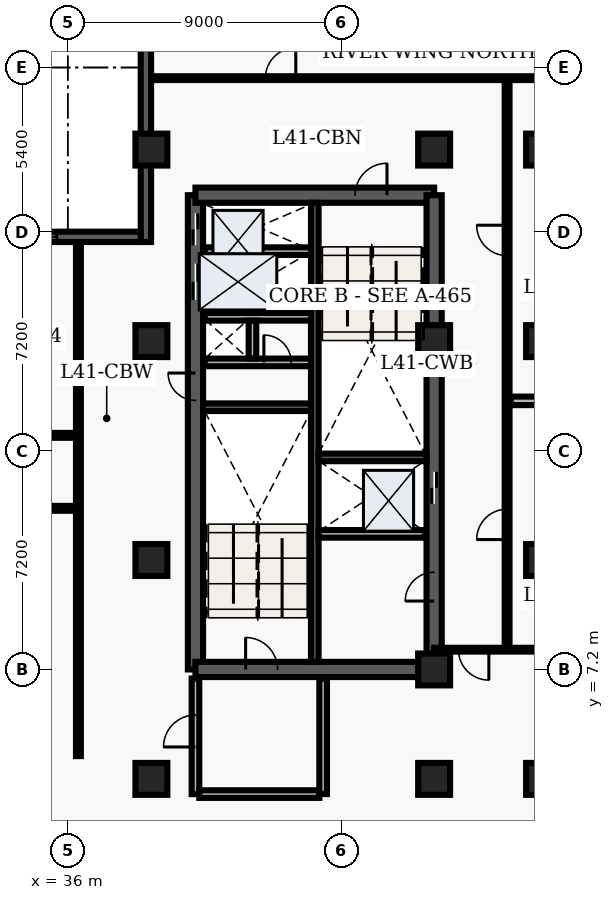
"""IFC4 building model, lengths in metres.
Left out: names, types, materials, properties, quantities, classifications, styles, units other than length and angle.
Written with IfcOpenShell. Run it as: python <this file> out.ifc"""

import sys

from ifc_helpers import new_model, entity, si_unit, converted_unit, direction, frame, origin_with_axes, origin_2d_with_axis, place, context, subcontext, project, spatial, polyline, rectangle, outline, extrude, element, fill, save


model = new_model("IFC4")
c1 = context("Model", 3, precision=1e-05, world=origin_with_axes(), true_north=direction((0.0, 1.0)))
c2 = subcontext(c1, "Body", "Model", "MODEL_VIEW")
j1 = project(units=[si_unit("LENGTHUNIT", "METRE"), converted_unit("PLANEANGLEUNIT", "DEGREE", entity("IfcPlaneAngleMeasure", 0.017), si_unit("PLANEANGLEUNIT", "RADIAN"), dimensions=[0, 0, 0, 0, 0, 0, 0])], contexts=[c1])
p1 = place(None, origin_with_axes())
s1 = spatial("IfcSite", under=j1, at=p1, CompositionType="ELEMENT")
p2 = place(p1, origin_with_axes())
s2 = spatial("IfcBuilding", under=s1, at=p2, CompositionType="ELEMENT")
p3 = place(p2, frame((0.0, 0.0, 168.0), z_axis=(0.0, 0.0, 1.0), x_axis=(1.0, 0.0, 0.0)))
s3 = spatial("IfcBuildingStorey", under=s2, at=p3, CompositionType="ELEMENT", Elevation=168.0)
p4 = place(p3, frame((40.2, 7.2, 0.0), z_axis=(0.0, 0.0, 1.0), x_axis=(0.0, 1.0, 0.0)))
e1 = element("IfcWall", 1, at=p4, inside=s3, PredefinedType="SHEAR", context=c2, shape_type="SweptSolid", body=[
    extrude(outline(polyline([(0.0, -0.25), (15.6, -0.25), (15.6, 0.25), (0.0, 0.25), (0.0, -0.25)])), origin_with_axes(), (0.0, 0.0, 1.0), 3.66),
])
p5 = place(p4, frame((14.475, 0.0, 0.0), z_axis=(0.0, 0.0, 1.0), x_axis=(1.0, 0.0, 0.0)))
e2 = element("IfcOpeningElement", 2, at=p5, cuts=e1, PredefinedType="OPENING", context=c2, shape_type="SweptSolid", body=[
    extrude(rectangle(XDim=1.05, YDim=0.52, at=origin_2d_with_axis()), origin_with_axes(), (0.0, 0.0, 1.0), 2.15),
])
p6 = place(p4, frame((12.75, 0.0, 0.0), z_axis=(0.0, 0.0, 1.0), x_axis=(1.0, 0.0, 0.0)))
e3 = element("IfcOpeningElement", 3, at=p6, cuts=e1, PredefinedType="OPENING", context=c2, shape_type="SweptSolid", body=[
    extrude(rectangle(XDim=1.2, YDim=0.52, at=origin_2d_with_axis()), origin_with_axes(), (0.0, 0.0, 1.0), 2.15),
])
p7 = place(p4, frame((9.3, 0.0, 0.0), z_axis=(0.0, 0.0, 1.0), x_axis=(1.0, 0.0, 0.0)))
e4 = element("IfcOpeningElement", 4, at=p7, cuts=e1, PredefinedType="OPENING", context=c2, shape_type="SweptSolid", body=[
    extrude(rectangle(XDim=0.9, YDim=0.52, at=origin_2d_with_axis()), origin_with_axes(), (0.0, 0.0, 1.0), 2.15),
])
p8 = place(p3, frame((40.2, 7.2, 0.0), z_axis=(0.0, 0.0, 1.0), x_axis=(1.0, 0.0, 0.0)))
e5 = element("IfcWall", 5, at=p8, inside=s3, PredefinedType="SHEAR", context=c2, shape_type="SweptSolid", body=[
    extrude(outline(polyline([(0.0, -0.25), (7.85, -0.25), (7.85, 0.25), (0.0, 0.25), (0.0, -0.25)])), origin_with_axes(), (0.0, 0.0, 1.0), 3.66),
])
p9 = place(p8, frame((2.175, 0.0, 0.0), z_axis=(0.0, 0.0, 1.0), x_axis=(1.0, 0.0, 0.0)))
e6 = element("IfcOpeningElement", 6, at=p9, cuts=e5, PredefinedType="OPENING", context=c2, shape_type="SweptSolid", body=[
    extrude(rectangle(XDim=1.05, YDim=0.52, at=origin_2d_with_axis()), origin_with_axes(), (0.0, 0.0, 1.0), 2.15),
])
p10 = place(p3, frame((40.2, 22.8, 0.0), z_axis=(0.0, 0.0, 1.0), x_axis=(1.0, 0.0, 0.0)))
e7 = element("IfcWall", 7, at=p10, inside=s3, PredefinedType="SHEAR", context=c2, shape_type="SweptSolid", body=[
    extrude(outline(polyline([(0.0, -0.25), (7.85, -0.25), (7.85, 0.25), (0.0, 0.25), (0.0, -0.25)])), origin_with_axes(), (0.0, 0.0, 1.0), 3.66),
])
p11 = place(p10, frame((5.775, 0.0, 0.0), z_axis=(0.0, 0.0, 1.0), x_axis=(1.0, 0.0, 0.0)))
e8 = element("IfcOpeningElement", 8, at=p11, cuts=e7, PredefinedType="OPENING", context=c2, shape_type="SweptSolid", body=[
    extrude(rectangle(XDim=1.05, YDim=0.52, at=origin_2d_with_axis()), origin_with_axes(), (0.0, 0.0, 1.0), 2.15),
])
p12 = place(p3, frame((48.05, 7.2, 0.0), z_axis=(0.0, 0.0, 1.0), x_axis=(0.0, 1.0, 0.0)))
e9 = element("IfcWall", 9, at=p12, inside=s3, PredefinedType="SHEAR", context=c2, shape_type="SweptSolid", body=[
    extrude(outline(polyline([(0.0, -0.25), (15.6, -0.25), (15.6, 0.25), (0.0, 0.25), (0.0, -0.25)])), origin_with_axes(), (0.0, 0.0, 1.0), 3.66),
])
p13 = place(p12, frame((5.975, 0.0, 0.0), z_axis=(0.0, 0.0, 1.0), x_axis=(1.0, 0.0, 0.0)))
e10 = element("IfcOpeningElement", 10, at=p13, cuts=e9, PredefinedType="OPENING", context=c2, shape_type="SweptSolid", body=[
    extrude(rectangle(XDim=1.05, YDim=0.52, at=origin_2d_with_axis()), origin_with_axes(), (0.0, 0.0, 1.0), 2.15),
])
p14 = place(p12, frame((2.725, 0.0, 0.0), z_axis=(0.0, 0.0, 1.0), x_axis=(1.0, 0.0, 0.0)))
e11 = element("IfcOpeningElement", 11, at=p14, cuts=e9, PredefinedType="OPENING", context=c2, shape_type="SweptSolid", body=[
    extrude(rectangle(XDim=0.95, YDim=0.52, at=origin_2d_with_axis()), origin_with_axes(), (0.0, 0.0, 1.0), 2.15),
])
p15 = place(p3, frame((44.125, 7.45, 0.0), z_axis=(0.0, 0.0, 1.0), x_axis=(0.0, 1.0, 0.0)))
e12 = element("IfcWall", 12, at=p15, inside=s3, PredefinedType="SHEAR", context=c2, shape_type="SweptSolid", body=[
    extrude(outline(polyline([(0.0, -0.125), (15.1, -0.125), (15.1, 0.125), (0.0, 0.125), (0.0, -0.125)])), origin_with_axes(), (0.0, 0.0, 1.0), 3.66),
])
for number, where, z_axis, x_axis in (
    (13, (40.45, 15.825, 0.0), (0.0, 0.0, 1.0), (1.0, 0.0, 0.0)),
    (14, (44.25, 14.175, 0.0), (0.0, 0.0, 1.0), (1.0, 0.0, 0.0)),
):
    element("IfcWall", number, at=place(p3, frame(where, z_axis=z_axis, x_axis=x_axis)), inside=s3, PredefinedType="SHEAR", context=c2, shape_type="SweptSolid", body=[
        extrude(outline(polyline([(0.0, -0.125), (3.55, -0.125), (3.55, 0.125), (0.0, 0.125), (0.0, -0.125)])), origin_with_axes(), (0.0, 0.0, 1.0), 3.66),
    ])
p16 = place(p3, frame((40.5, 17.3, 0.0), z_axis=(0.0, 0.0, 1.0), x_axis=(1.0, 0.0, 0.0)))
e15 = element("IfcWall", 15, at=p16, inside=s3, PredefinedType="SOLIDWALL", context=c2, shape_type="SweptSolid", body=[
    extrude(outline(polyline([(0.0, -0.125), (3.5, -0.125), (3.5, 0.125), (0.0, 0.125), (0.0, -0.125)])), origin_with_axes(), (0.0, 0.0, 1.0), 2.7),
])
p17 = place(p16, frame((2.4, 0.0, 0.0), z_axis=(0.0, 0.0, 1.0), x_axis=(1.0, 0.0, 0.0)))
e16 = element("IfcOpeningElement", 16, at=p17, cuts=e15, PredefinedType="OPENING", context=c2, shape_type="SweptSolid", body=[
    extrude(rectangle(XDim=0.9, YDim=0.27, at=origin_2d_with_axis()), origin_with_axes(), (0.0, 0.0, 1.0), 2.15),
])
p18 = place(p3, frame((40.5, 18.8, 0.0), z_axis=(0.0, 0.0, 1.0), x_axis=(1.0, 0.0, 0.0)))
e17 = element("IfcWall", 17, at=p18, inside=s3, PredefinedType="SOLIDWALL", context=c2, shape_type="SweptSolid", body=[
    extrude(outline(polyline([(0.0, -0.125), (3.5, -0.125), (3.5, 0.125), (0.0, 0.125), (0.0, -0.125)])), origin_with_axes(), (0.0, 0.0, 1.0), 2.7),
])
p19 = place(p3, frame((42.075, 17.43, 0.0), z_axis=(0.0, 0.0, 1.0), x_axis=(0.0, 1.0, 0.0)))
e18 = element("IfcWall", 18, at=p19, inside=s3, PredefinedType="SOLIDWALL", context=c2, shape_type="SweptSolid", body=[
    extrude(outline(polyline([(0.0, -0.125), (1.24, -0.125), (1.24, 0.125), (0.0, 0.125), (0.0, -0.125)])), origin_with_axes(), (0.0, 0.0, 1.0), 2.7),
])
p20 = place(p3, frame((40.2, 3.1, 0.0), z_axis=(0.0, 0.0, 1.0), x_axis=(0.0, 1.0, 0.0)))
e19 = element("IfcWall", 19, at=p20, inside=s3, PredefinedType="SOLIDWALL", context=c2, shape_type="SweptSolid", body=[
    extrude(outline(polyline([(0.0, -0.125), (3.8, -0.125), (3.8, 0.125), (0.0, 0.125), (0.0, -0.125)])), origin_with_axes(), (0.0, 0.0, 1.0), 2.7),
])
p21 = place(p20, frame((2.075, 0.0, 0.0), z_axis=(0.0, 0.0, 1.0), x_axis=(1.0, 0.0, 0.0)))
e20 = element("IfcOpeningElement", 20, at=p21, cuts=e19, PredefinedType="OPENING", context=c2, shape_type="SweptSolid", body=[
    extrude(rectangle(XDim=1.05, YDim=0.27, at=origin_2d_with_axis()), origin_with_axes(), (0.0, 0.0, 1.0), 2.15),
])
p22 = place(p3, frame((40.325, 3.1, 0.0), z_axis=(0.0, 0.0, 1.0), x_axis=(1.0, 0.0, 0.0)))
e21 = element("IfcWall", 21, at=p22, inside=s3, PredefinedType="SOLIDWALL", context=c2, shape_type="SweptSolid", body=[
    extrude(outline(polyline([(0.0, -0.125), (3.95, -0.125), (3.95, 0.125), (0.0, 0.125), (0.0, -0.125)])), origin_with_axes(), (0.0, 0.0, 1.0), 2.7),
])
p23 = place(p3, frame((44.4, 3.1, 0.0), z_axis=(0.0, 0.0, 1.0), x_axis=(0.0, 1.0, 0.0)))
e22 = element("IfcWall", 22, at=p23, inside=s3, PredefinedType="SOLIDWALL", context=c2, shape_type="SweptSolid", body=[
    extrude(outline(polyline([(0.0, -0.125), (3.8, -0.125), (3.8, 0.125), (0.0, 0.125), (0.0, -0.125)])), origin_with_axes(), (0.0, 0.0, 1.0), 2.7),
])
for number, where, z_axis, x_axis in (
    (23, (38.75, 3.6, 0.0), (0.0, 0.0, 1.0), (1.0, 0.0, 0.0)),
    (24, (38.75, 10.8, 0.0), (0.0, 0.0, 1.0), (1.0, 0.0, 0.0)),
    (25, (38.75, 18.0, 0.0), (0.0, 0.0, 1.0), (1.0, 0.0, 0.0)),
    (26, (38.75, 24.3, 0.0), (0.0, 0.0, 1.0), (1.0, 0.0, 0.0)),
    (27, (48.05, 3.6, 0.0), (0.0, 0.0, 1.0), (1.0, 0.0, 0.0)),
    (28, (48.05, 7.2, 0.0), (0.0, 0.0, 1.0), (1.0, 0.0, 0.0)),
    (29, (48.05, 18.0, 0.0), (0.0, 0.0, 1.0), (1.0, 0.0, 0.0)),
    (30, (48.05, 24.3, 0.0), (0.0, 0.0, 1.0), (1.0, 0.0, 0.0)),
    (31, (51.6, 3.6, 0.0), (0.0, 0.0, 1.0), (1.0, 0.0, 0.0)),
    (32, (51.6, 10.8, 0.0), (0.0, 0.0, 1.0), (1.0, 0.0, 0.0)),
    (33, (51.6, 18.0, 0.0), (0.0, 0.0, 1.0), (1.0, 0.0, 0.0)),
    (34, (51.6, 24.3, 0.0), (0.0, 0.0, 1.0), (1.0, 0.0, 0.0)),
):
    element("IfcColumn", number, at=place(p3, frame(where, z_axis=z_axis, x_axis=x_axis)), inside=s3, PredefinedType="COLUMN", context=c2, shape_type="SweptSolid", body=[
        extrude(rectangle(XDim=1.05, YDim=1.05, at=origin_2d_with_axis()), origin_with_axes(), (0.0, 0.0, 1.0), 3.9),
    ])
for number, where, z_axis, x_axis in (
    (35, (40.5, 20.96, 0.0), (0.0, 0.0, 1.0), (1.0, 0.0, 0.0)),
    (36, (44.25, 11.66, 0.0), (0.0, 0.0, 1.0), (1.0, 0.0, 0.0)),
):
    element("IfcWall", number, at=place(p3, frame(where, z_axis=z_axis, x_axis=x_axis)), inside=s3, PredefinedType="SOLIDWALL", context=c2, shape_type="SweptSolid", body=[
        extrude(outline(polyline([(0.0, -0.125), (3.5, -0.125), (3.5, 0.125), (0.0, 0.125), (0.0, -0.125)])), origin_with_axes(), (0.0, 0.0, 1.0), 2.7),
    ])
p24 = place(p3, frame((21.15, 12.5, 0.0), z_axis=(0.0, 0.0, 1.0), x_axis=(1.0, 0.0, 0.0)))
e37 = element("IfcWall", 37, at=p24, inside=s3, PredefinedType="PARTITIONING", context=c2, shape_type="SweptSolid", body=[
    extrude(outline(polyline([(0.0, -0.08), (15.2, -0.08), (15.2, 0.08), (0.0, 0.08), (0.0, -0.08)])), origin_with_axes(), (0.0, 0.0, 1.0), 2.7),
])
p25 = place(p24, frame((3.47, 0.0, 0.0), z_axis=(0.0, 0.0, 1.0), x_axis=(1.0, 0.0, 0.0)))
e38 = element("IfcOpeningElement", 38, at=p25, cuts=e37, PredefinedType="OPENING", context=c2, shape_type="SweptSolid", body=[
    extrude(rectangle(XDim=1.0, YDim=0.18, at=origin_2d_with_axis()), origin_with_axes(), (0.0, 0.0, 1.0), 2.15),
])
p26 = place(p24, frame((10.94, 0.0, 0.0), z_axis=(0.0, 0.0, 1.0), x_axis=(1.0, 0.0, 0.0)))
e39 = element("IfcOpeningElement", 39, at=p26, cuts=e37, PredefinedType="OPENING", context=c2, shape_type="SweptSolid", body=[
    extrude(rectangle(XDim=1.0, YDim=0.18, at=origin_2d_with_axis()), origin_with_axes(), (0.0, 0.0, 1.0), 2.15),
])
p27 = place(p3, frame((21.15, 14.9, 0.0), z_axis=(0.0, 0.0, 1.0), x_axis=(1.0, 0.0, 0.0)))
e40 = element("IfcWall", 40, at=p27, inside=s3, PredefinedType="PARTITIONING", context=c2, shape_type="SweptSolid", body=[
    extrude(outline(polyline([(0.0, -0.08), (15.2, -0.08), (15.2, 0.08), (0.0, 0.08), (0.0, -0.08)])), origin_with_axes(), (0.0, 0.0, 1.0), 2.7),
])
p28 = place(p27, frame((2.563, 0.0, 0.0), z_axis=(0.0, 0.0, 1.0), x_axis=(1.0, 0.0, 0.0)))
e41 = element("IfcOpeningElement", 41, at=p28, cuts=e40, PredefinedType="OPENING", context=c2, shape_type="SweptSolid", body=[
    extrude(rectangle(XDim=1.0, YDim=0.18, at=origin_2d_with_axis()), origin_with_axes(), (0.0, 0.0, 1.0), 2.15),
])
p29 = place(p27, frame((6.457, 0.0, 0.0), z_axis=(0.0, 0.0, 1.0), x_axis=(1.0, 0.0, 0.0)))
e42 = element("IfcOpeningElement", 42, at=p29, cuts=e40, PredefinedType="OPENING", context=c2, shape_type="SweptSolid", body=[
    extrude(rectangle(XDim=1.0, YDim=0.18, at=origin_2d_with_axis()), origin_with_axes(), (0.0, 0.0, 1.0), 2.15),
])
p30 = place(p27, frame((9.627, 0.0, 0.0), z_axis=(0.0, 0.0, 1.0), x_axis=(1.0, 0.0, 0.0)))
e43 = element("IfcOpeningElement", 43, at=p30, cuts=e40, PredefinedType="OPENING", context=c2, shape_type="SweptSolid", body=[
    extrude(rectangle(XDim=1.0, YDim=0.18, at=origin_2d_with_axis()), origin_with_axes(), (0.0, 0.0, 1.0), 2.15),
])
p31 = place(p27, frame((13.204, 0.0, 0.0), z_axis=(0.0, 0.0, 1.0), x_axis=(1.0, 0.0, 0.0)))
e44 = element("IfcOpeningElement", 44, at=p31, cuts=e40, PredefinedType="OPENING", context=c2, shape_type="SweptSolid", body=[
    extrude(rectangle(XDim=1.0, YDim=0.18, at=origin_2d_with_axis()), origin_with_axes(), (0.0, 0.0, 1.0), 2.15),
])
p32 = place(p3, frame((36.35, 4.35, 0.0), z_axis=(0.0, 0.0, 1.0), x_axis=(0.0, 1.0, 0.0)))
e45 = element("IfcWall", 45, at=p32, inside=s3, PredefinedType="PARTITIONING", context=c2, shape_type="SweptSolid", body=[
    extrude(outline(polyline([(0.0, -0.08), (16.95, -0.08), (16.95, 0.08), (0.0, 0.08), (0.0, -0.08)])), origin_with_axes(), (0.0, 0.0, 1.0), 2.7),
])
p33 = place(p3, frame((50.45, 7.85, 0.0), z_axis=(0.0, 0.0, 1.0), x_axis=(0.0, 1.0, 0.0)))
e46 = element("IfcWall", 46, at=p33, inside=s3, PredefinedType="PARTITIONING", context=c2, shape_type="SweptSolid", body=[
    extrude(outline(polyline([(0.0, -0.08), (18.8, -0.08), (18.8, 0.08), (0.0, 0.08), (0.0, -0.08)])), origin_with_axes(), (0.0, 0.0, 1.0), 2.7),
])
p34 = place(p33, frame((4.122, 0.0, 0.0), z_axis=(0.0, 0.0, 1.0), x_axis=(1.0, 0.0, 0.0)))
e47 = element("IfcOpeningElement", 47, at=p34, cuts=e46, PredefinedType="OPENING", context=c2, shape_type="SweptSolid", body=[
    extrude(rectangle(XDim=1.0, YDim=0.18, at=origin_2d_with_axis()), origin_with_axes(), (0.0, 0.0, 1.0), 2.15),
])
p35 = place(p33, frame((13.463, 0.0, 0.0), z_axis=(0.0, 0.0, 1.0), x_axis=(1.0, 0.0, 0.0)))
e48 = element("IfcOpeningElement", 48, at=p35, cuts=e46, PredefinedType="OPENING", context=c2, shape_type="SweptSolid", body=[
    extrude(rectangle(XDim=1.0, YDim=0.18, at=origin_2d_with_axis()), origin_with_axes(), (0.0, 0.0, 1.0), 2.15),
])
p36 = place(p3, frame((59.665, 7.85, 0.0), z_axis=(0.0, 0.0, 1.0), x_axis=(-1.0, 0.0, 0.0)))
e49 = element("IfcWall", 49, at=p36, inside=s3, PredefinedType="PARTITIONING", context=c2, shape_type="SweptSolid", body=[
    extrude(outline(polyline([(0.0, -0.062), (11.615, -0.062), (11.615, 0.062), (0.0, 0.062), (0.0, -0.062)])), origin_with_axes(), (0.0, 0.0, 1.0), 2.7),
])
p37 = place(p36, frame((10.315, 0.0, 0.0), z_axis=(0.0, 0.0, 1.0), x_axis=(1.0, 0.0, 0.0)))
e50 = element("IfcOpeningElement", 50, at=p37, cuts=e49, PredefinedType="OPENING", context=c2, shape_type="SweptSolid", body=[
    extrude(rectangle(XDim=1.0, YDim=0.145, at=origin_2d_with_axis()), origin_with_axes(), (0.0, 0.0, 1.0), 2.15),
])
p38 = place(p3, frame((38.735, 26.65, 0.0), z_axis=(0.0, 0.0, 1.0), x_axis=(1.0, 0.0, 0.0)))
e51 = element("IfcWall", 51, at=p38, inside=s3, PredefinedType="PARTITIONING", context=c2, shape_type="SweptSolid", body=[
    extrude(outline(polyline([(0.0, -0.062), (20.905, -0.062), (20.905, 0.062), (0.0, 0.062), (0.0, -0.062)])), origin_with_axes(), (0.0, 0.0, 1.0), 2.7),
])
p39 = place(p38, frame((4.265, 0.0, 0.0), z_axis=(0.0, 0.0, 1.0), x_axis=(1.0, 0.0, 0.0)))
e52 = element("IfcOpeningElement", 52, at=p39, cuts=e51, PredefinedType="OPENING", context=c2, shape_type="SweptSolid", body=[
    extrude(rectangle(XDim=1.0, YDim=0.145, at=origin_2d_with_axis()), origin_with_axes(), (0.0, 0.0, 1.0), 2.15),
])
p40 = place(p3, frame((50.57, 16.035, 0.0), z_axis=(0.0, 0.0, 1.0), x_axis=(1.0, 0.0, 0.0)))
e53 = element("IfcWall", 53, at=p40, inside=s3, PredefinedType="PARTITIONING", context=c2, shape_type="SweptSolid", body=[
    extrude(outline(polyline([(0.0, -0.14), (9.095, -0.14), (9.095, 0.14), (0.0, 0.14), (0.0, -0.14)])), origin_with_axes(), (0.0, 0.0, 1.0), 2.7),
])
p41 = place(p3, frame((38.57, 21.26, 0.0), z_axis=(0.0, 0.0, 1.0), x_axis=(0.0, 1.0, 0.0)))
e54 = element("IfcWall", 54, at=p41, inside=s3, PredefinedType="SOLIDWALL", context=c2, shape_type="SweptSolid", body=[
    extrude(outline(polyline([(0.0, -0.17), (7.54, -0.17), (7.54, 0.17), (0.0, 0.17), (0.0, -0.17)])), origin_with_axes(), (0.0, 0.0, 1.0), 3.66),
])
p42 = place(p3, frame((23.919, 21.43, 0.0), z_axis=(0.0, 0.0, 1.0), x_axis=(1.0, 0.0, 0.0)))
e55 = element("IfcWall", 55, at=p42, inside=s3, PredefinedType="SOLIDWALL", context=c2, shape_type="SweptSolid", body=[
    extrude(outline(polyline([(0.0, -0.17), (14.481, -0.17), (14.481, 0.17), (0.0, 0.17), (0.0, -0.17)])), origin_with_axes(), (0.0, 0.0, 1.0), 3.66),
])
p43 = place(p42, frame((3.663, 0.0, 0.45), z_axis=(0.0, 0.0, 1.0), x_axis=(1.0, 0.0, 0.0)))
e56 = element("IfcOpeningElement", 56, at=p43, cuts=e55, PredefinedType="OPENING", context=c2, shape_type="SweptSolid", body=[
    extrude(rectangle(XDim=1.8, YDim=0.36, at=origin_2d_with_axis()), origin_with_axes(), (0.0, 0.0, 1.0), 2.1),
])
p44 = place(p42, frame((6.79, 0.0, 0.45), z_axis=(0.0, 0.0, 1.0), x_axis=(1.0, 0.0, 0.0)))
e57 = element("IfcOpeningElement", 57, at=p44, cuts=e55, PredefinedType="OPENING", context=c2, shape_type="SweptSolid", body=[
    extrude(rectangle(XDim=1.8, YDim=0.36, at=origin_2d_with_axis()), origin_with_axes(), (0.0, 0.0, 1.0), 2.1),
])
p45 = place(p42, frame((10.817, 0.0, 0.45), z_axis=(0.0, 0.0, 1.0), x_axis=(1.0, 0.0, 0.0)))
e58 = element("IfcOpeningElement", 58, at=p45, cuts=e55, PredefinedType="OPENING", context=c2, shape_type="SweptSolid", body=[
    extrude(rectangle(XDim=1.8, YDim=0.36, at=origin_2d_with_axis()), origin_with_axes(), (0.0, 0.0, 1.0), 2.1),
])
p46 = place(p12, frame((5.975, 0.0, 0.0), z_axis=(0.0, 0.0, 1.0), x_axis=(1.0, 0.0, 0.0)))
e59 = element("IfcDoor", 59, at=p46, inside=s3, OperationType="SLIDING_TO_LEFT", PredefinedType="DOOR", context=c2, shape_type="SweptSolid", body=[
    extrude(rectangle(XDim=1.05, YDim=0.09, at=origin_2d_with_axis()), origin_with_axes(), (0.0, 0.0, 1.0), 2.15),
])
fill(e10, e59)
p47 = place(p4, frame((14.475, 0.0, 0.0), z_axis=(0.0, 0.0, 1.0), x_axis=(1.0, 0.0, 0.0)))
e60 = element("IfcDoor", 60, at=p47, inside=s3, OperationType="SLIDING_TO_RIGHT", PredefinedType="DOOR", context=c2, shape_type="SweptSolid", body=[
    extrude(rectangle(XDim=1.05, YDim=0.09, at=origin_2d_with_axis()), origin_with_axes(), (0.0, 0.0, 1.0), 2.15),
])
fill(e2, e60)
p48 = place(p4, frame((12.75, 0.0, 0.0), z_axis=(0.0, 0.0, 1.0), x_axis=(1.0, 0.0, 0.0)))
e61 = element("IfcDoor", 61, at=p48, inside=s3, OperationType="DOUBLE_DOOR_SLIDING", PredefinedType="DOOR", context=c2, shape_type="SweptSolid", body=[
    extrude(rectangle(XDim=1.2, YDim=0.09, at=origin_2d_with_axis()), origin_with_axes(), (0.0, 0.0, 1.0), 2.15),
])
fill(e3, e61)
p49 = place(p4, frame((9.3, 0.0, 0.0), z_axis=(0.0, 0.0, 1.0), x_axis=(1.0, 0.0, 0.0)))
e62 = element("IfcDoor", 62, at=p49, inside=s3, OperationType="SINGLE_SWING_RIGHT", PredefinedType="DOOR", context=c2, shape_type="SweptSolid", body=[
    extrude(rectangle(XDim=0.9, YDim=0.09, at=origin_2d_with_axis()), origin_with_axes(), (0.0, 0.0, 1.0), 2.15),
])
fill(e4, e62)
p50 = place(p16, frame((2.4, 0.0, 0.0), z_axis=(0.0, 0.0, 1.0), x_axis=(1.0, 0.0, 0.0)))
e63 = element("IfcDoor", 63, at=p50, inside=s3, OperationType="SINGLE_SWING_LEFT", PredefinedType="DOOR", context=c2, shape_type="SweptSolid", body=[
    extrude(rectangle(XDim=0.9, YDim=0.09, at=origin_2d_with_axis()), origin_with_axes(), (0.0, 0.0, 1.0), 2.15),
])
fill(e16, e63)
p51 = place(p8, frame((2.175, 0.0, 0.0), z_axis=(0.0, 0.0, 1.0), x_axis=(1.0, 0.0, 0.0)))
e64 = element("IfcDoor", 64, at=p51, inside=s3, OperationType="SINGLE_SWING_LEFT", PredefinedType="DOOR", context=c2, shape_type="SweptSolid", body=[
    extrude(rectangle(XDim=1.05, YDim=0.09, at=origin_2d_with_axis()), origin_with_axes(), (0.0, 0.0, 1.0), 2.15),
])
fill(e6, e64)
p52 = place(p10, frame((5.775, 0.0, 0.0), z_axis=(0.0, 0.0, 1.0), x_axis=(1.0, 0.0, 0.0)))
e65 = element("IfcDoor", 65, at=p52, inside=s3, OperationType="SINGLE_SWING_RIGHT", PredefinedType="DOOR", context=c2, shape_type="SweptSolid", body=[
    extrude(rectangle(XDim=1.05, YDim=0.09, at=origin_2d_with_axis()), origin_with_axes(), (0.0, 0.0, 1.0), 2.15),
])
fill(e8, e65)
p53 = place(p20, frame((2.075, 0.0, 0.0), z_axis=(0.0, 0.0, 1.0), x_axis=(1.0, 0.0, 0.0)))
e66 = element("IfcDoor", 66, at=p53, inside=s3, OperationType="SINGLE_SWING_LEFT", PredefinedType="DOOR", context=c2, shape_type="SweptSolid", body=[
    extrude(rectangle(XDim=1.05, YDim=0.09, at=origin_2d_with_axis()), origin_with_axes(), (0.0, 0.0, 1.0), 2.15),
])
fill(e20, e66)
p54 = place(p12, frame((2.725, 0.0, 0.0), z_axis=(0.0, 0.0, 1.0), x_axis=(1.0, 0.0, 0.0)))
e67 = element("IfcDoor", 67, at=p54, inside=s3, OperationType="SINGLE_SWING_LEFT", PredefinedType="DOOR", context=c2, shape_type="SweptSolid", body=[
    extrude(rectangle(XDim=0.95, YDim=0.09, at=origin_2d_with_axis()), origin_with_axes(), (0.0, 0.0, 1.0), 2.15),
])
fill(e11, e67)
p55 = place(p36, frame((10.315, 0.0, 0.0), z_axis=(0.0, 0.0, 1.0), x_axis=(1.0, 0.0, 0.0)))
e68 = element("IfcDoor", 68, at=p55, inside=s3, OperationType="SINGLE_SWING_LEFT", PredefinedType="DOOR", context=c2, shape_type="SweptSolid", body=[
    extrude(rectangle(XDim=1.0, YDim=0.075, at=origin_2d_with_axis()), origin_with_axes(), (0.0, 0.0, 1.0), 2.15),
])
fill(e50, e68)
p56 = place(p38, frame((4.265, 0.0, 0.0), z_axis=(0.0, 0.0, 1.0), x_axis=(1.0, 0.0, 0.0)))
e69 = element("IfcDoor", 69, at=p56, inside=s3, OperationType="SINGLE_SWING_RIGHT", PredefinedType="DOOR", context=c2, shape_type="SweptSolid", body=[
    extrude(rectangle(XDim=1.0, YDim=0.075, at=origin_2d_with_axis()), origin_with_axes(), (0.0, 0.0, 1.0), 2.15),
])
fill(e52, e69)
p57 = place(p33, frame((4.122, 0.0, 0.0), z_axis=(0.0, 0.0, 1.0), x_axis=(1.0, 0.0, 0.0)))
e70 = element("IfcDoor", 70, at=p57, inside=s3, OperationType="SINGLE_SWING_LEFT", PredefinedType="DOOR", context=c2, shape_type="SweptSolid", body=[
    extrude(rectangle(XDim=1.0, YDim=0.09, at=origin_2d_with_axis()), origin_with_axes(), (0.0, 0.0, 1.0), 2.15),
])
fill(e47, e70)
p58 = place(p33, frame((13.463, 0.0, 0.0), z_axis=(0.0, 0.0, 1.0), x_axis=(1.0, 0.0, 0.0)))
e71 = element("IfcDoor", 71, at=p58, inside=s3, OperationType="SINGLE_SWING_RIGHT", PredefinedType="DOOR", context=c2, shape_type="SweptSolid", body=[
    extrude(rectangle(XDim=1.0, YDim=0.09, at=origin_2d_with_axis()), origin_with_axes(), (0.0, 0.0, 1.0), 2.15),
])
fill(e48, e71)
p59 = place(p42, frame((10.817, 0.0, 0.45), z_axis=(0.0, 0.0, 1.0), x_axis=(1.0, 0.0, 0.0)))
e72 = element("IfcWindow", 72, at=p59, inside=s3, PredefinedType="WINDOW", context=c2, shape_type="SweptSolid", body=[
    extrude(rectangle(XDim=1.8, YDim=0.09, at=origin_2d_with_axis()), origin_with_axes(), (0.0, 0.0, 1.0), 2.1),
])
fill(e58, e72)
save(model, sys.argv[1])
